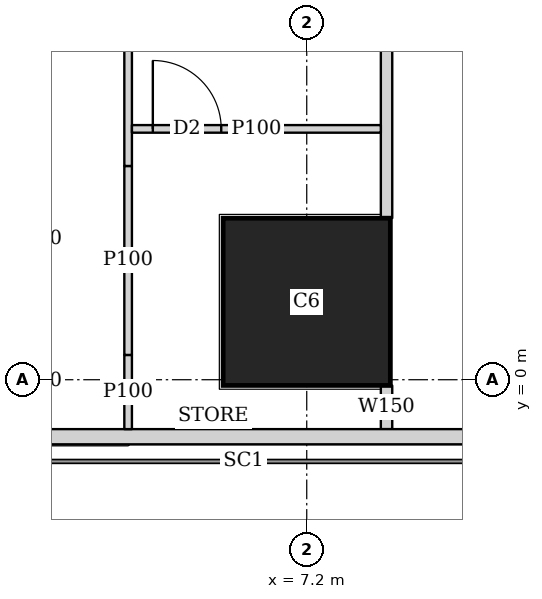
"""IFC4 building model, lengths in metres.
Left out: names, types, materials, properties, quantities, classifications, styles, units other than length and angle.
Written with IfcOpenShell. Run it as: python <this file> out.ifc"""

import sys

from ifc_helpers import new_model, si_unit, direction, frame, frame_2d, origin, origin_2d, place, context, subcontext, project, spatial, rectangle, extrude, element, fill, save


model = new_model("IFC4")
c1 = context("Model", 3, precision=1e-05, world=origin(), true_north=direction((0.0, 1.0)))
c2 = subcontext(c1, "Body", "Model", "MODEL_VIEW")
j1 = project(units=[si_unit("LENGTHUNIT", "METRE"), si_unit("PLANEANGLEUNIT", "RADIAN")], contexts=[c1])
p1 = place(None, origin())
s1 = spatial("IfcSite", under=j1, at=p1, CompositionType="ELEMENT")
p2 = place(p1, origin())
s2 = spatial("IfcBuilding", under=s1, at=p2, CompositionType="ELEMENT")
p3 = place(p2, frame((0.0, 0.0, 126.65)))
s3 = spatial("IfcBuildingStorey", under=s2, at=p3, CompositionType="ELEMENT", Elevation=126.65)
p4 = place(p3, frame((7.2, 1.025, 0.0), z_axis=(0.0, 0.0, 1.0), x_axis=(1.0, 0.0, 0.0)))
e1 = element("IfcColumn", 1, at=p4, inside=s3, PredefinedType="COLUMN", context=c2, shape_type="SweptSolid", body=[
    extrude(rectangle(XDim=2.2, YDim=2.2, at=origin_2d()), origin(), (0.0, 0.0, 1.0), 3.75),
])
p5 = place(p3, frame((2.163, -0.75, 0.0), z_axis=(0.0, 0.0, 1.0), x_axis=(1.0, 0.0, 0.0)))
e2 = element("IfcWall", 2, at=p5, inside=s3, PredefinedType="SOLIDWALL", context=c2, shape_type="SweptSolid", body=[
    extrude(rectangle(XDim=45.628, YDim=0.2, at=frame_2d((22.814, 0.0))), origin(), (0.0, 0.0, 1.0), 3.45),
])
p6 = place(p5, frame((9.537, 0.0, 0.9)))
e3 = element("IfcOpeningElement", 3, at=p6, cuts=e2, PredefinedType="OPENING", context=c2, shape_type="SweptSolid", body=[
    extrude(rectangle(XDim=1.8, YDim=1.5, at=frame_2d((0.9, 0.75))), frame((0.0, 0.11, 0.0), z_axis=(0.0, -1.0, 0.0), x_axis=(1.0, 0.0, 0.0)), (0.0, 0.0, 1.0), 0.22),
])
p7 = place(p5, frame((13.137, 0.0, 0.9)))
e4 = element("IfcOpeningElement", 4, at=p7, cuts=e2, PredefinedType="OPENING", context=c2, shape_type="SweptSolid", body=[
    extrude(rectangle(XDim=1.8, YDim=1.5, at=frame_2d((0.9, 0.75))), frame((0.0, 0.11, 0.0), z_axis=(0.0, -1.0, 0.0), x_axis=(1.0, 0.0, 0.0)), (0.0, 0.0, 1.0), 0.22),
])
p8 = place(p5, frame((16.737, 0.0, 0.9)))
e5 = element("IfcOpeningElement", 5, at=p8, cuts=e2, PredefinedType="OPENING", context=c2, shape_type="SweptSolid", body=[
    extrude(rectangle(XDim=1.8, YDim=1.5, at=frame_2d((0.9, 0.75))), frame((0.0, 0.11, 0.0), z_axis=(0.0, -1.0, 0.0), x_axis=(1.0, 0.0, 0.0)), (0.0, 0.0, 1.0), 0.22),
])
p9 = place(p5, frame((20.337, 0.0, 0.9)))
e6 = element("IfcOpeningElement", 6, at=p9, cuts=e2, PredefinedType="OPENING", context=c2, shape_type="SweptSolid", body=[
    extrude(rectangle(XDim=1.8, YDim=1.5, at=frame_2d((0.9, 0.75))), frame((0.0, 0.11, 0.0), z_axis=(0.0, -1.0, 0.0), x_axis=(1.0, 0.0, 0.0)), (0.0, 0.0, 1.0), 0.22),
])
p10 = place(p5, frame((23.937, 0.0, 0.9)))
e7 = element("IfcOpeningElement", 7, at=p10, cuts=e2, PredefinedType="OPENING", context=c2, shape_type="SweptSolid", body=[
    extrude(rectangle(XDim=1.8, YDim=1.5, at=frame_2d((0.9, 0.75))), frame((0.0, 0.11, 0.0), z_axis=(0.0, -1.0, 0.0), x_axis=(1.0, 0.0, 0.0)), (0.0, 0.0, 1.0), 0.22),
])
p11 = place(p5, frame((27.537, 0.0, 0.9)))
e8 = element("IfcOpeningElement", 8, at=p11, cuts=e2, PredefinedType="OPENING", context=c2, shape_type="SweptSolid", body=[
    extrude(rectangle(XDim=1.8, YDim=1.5, at=frame_2d((0.9, 0.75))), frame((0.0, 0.11, 0.0), z_axis=(0.0, -1.0, 0.0), x_axis=(1.0, 0.0, 0.0)), (0.0, 0.0, 1.0), 0.22),
])
p12 = place(p5, frame((31.137, 0.0, 0.9)))
e9 = element("IfcOpeningElement", 9, at=p12, cuts=e2, PredefinedType="OPENING", context=c2, shape_type="SweptSolid", body=[
    extrude(rectangle(XDim=1.8, YDim=1.5, at=frame_2d((0.9, 0.75))), frame((0.0, 0.11, 0.0), z_axis=(0.0, -1.0, 0.0), x_axis=(1.0, 0.0, 0.0)), (0.0, 0.0, 1.0), 0.22),
])
p13 = place(p5, frame((34.737, 0.0, 0.9)))
e10 = element("IfcOpeningElement", 10, at=p13, cuts=e2, PredefinedType="OPENING", context=c2, shape_type="SweptSolid", body=[
    extrude(rectangle(XDim=1.8, YDim=1.5, at=frame_2d((0.9, 0.75))), frame((0.0, 0.11, 0.0), z_axis=(0.0, -1.0, 0.0), x_axis=(1.0, 0.0, 0.0)), (0.0, 0.0, 1.0), 0.22),
])
p14 = place(p3, frame((8.25, -0.65, 0.0), z_axis=(0.0, 0.0, 1.0), x_axis=(0.0, 1.0, 0.0)))
e11 = element("IfcWall", 11, at=p14, inside=s3, PredefinedType="SOLIDWALL", context=c2, shape_type="SweptSolid", body=[
    extrude(rectangle(XDim=0.574, YDim=0.15, at=frame_2d((0.287, 0.0))), origin(), (0.0, 0.0, 1.0), 3.45),
])
p15 = place(p3, frame((8.25, 2.126, 0.0), z_axis=(0.0, 0.0, 1.0), x_axis=(0.0, 1.0, 0.0)))
e12 = element("IfcWall", 12, at=p15, inside=s3, PredefinedType="SOLIDWALL", context=c2, shape_type="SweptSolid", body=[
    extrude(rectangle(XDim=40.773, YDim=0.15, at=frame_2d((20.386, 0.0))), origin(), (0.0, 0.0, 1.0), 3.45),
])
p16 = place(p15, frame((10.286, 0.0, 0.0)))
e13 = element("IfcOpeningElement", 13, at=p16, cuts=e12, PredefinedType="OPENING", context=c2, shape_type="SweptSolid", body=[
    extrude(rectangle(XDim=1.0, YDim=2.1, at=frame_2d((0.5, 1.05))), frame((0.0, 0.085, 0.0), z_axis=(0.0, -1.0, 0.0), x_axis=(1.0, 0.0, 0.0)), (0.0, 0.0, 1.0), 0.17),
])
p17 = place(p15, frame((14.461, 0.0, 0.0)))
e14 = element("IfcOpeningElement", 14, at=p17, cuts=e12, PredefinedType="OPENING", context=c2, shape_type="SweptSolid", body=[
    extrude(rectangle(XDim=1.0, YDim=2.1, at=frame_2d((0.5, 1.05))), frame((0.0, 0.085, 0.0), z_axis=(0.0, -1.0, 0.0), x_axis=(1.0, 0.0, 0.0)), (0.0, 0.0, 1.0), 0.17),
])
p18 = place(p15, frame((21.962, 0.0, 0.0)))
e15 = element("IfcOpeningElement", 15, at=p18, cuts=e12, PredefinedType="OPENING", context=c2, shape_type="SweptSolid", body=[
    extrude(rectangle(XDim=1.0, YDim=2.1, at=frame_2d((0.5, 1.05))), frame((0.0, 0.085, 0.0), z_axis=(0.0, -1.0, 0.0), x_axis=(1.0, 0.0, 0.0)), (0.0, 0.0, 1.0), 0.17),
])
p19 = place(p15, frame((29.461, 0.0, 0.0)))
e16 = element("IfcOpeningElement", 16, at=p19, cuts=e12, PredefinedType="OPENING", context=c2, shape_type="SweptSolid", body=[
    extrude(rectangle(XDim=1.0, YDim=2.1, at=frame_2d((0.5, 1.05))), frame((0.0, 0.085, 0.0), z_axis=(0.0, -1.0, 0.0), x_axis=(1.0, 0.0, 0.0)), (0.0, 0.0, 1.0), 0.17),
])
p20 = place(p3, frame((4.85, -0.65, 0.0), z_axis=(0.0, 0.0, 1.0), x_axis=(0.0, 1.0, 0.0)))
e17 = element("IfcWall", 17, at=p20, inside=s3, PredefinedType="PARTITIONING", context=c2, shape_type="SweptSolid", body=[
    extrude(rectangle(XDim=0.976, YDim=0.1, at=frame_2d((0.488, 0.0))), origin(), (0.0, 0.0, 1.0), 3.45),
])
p21 = place(p3, frame((4.85, 0.326, 0.0), z_axis=(0.0, 0.0, 1.0), x_axis=(0.0, 1.0, 0.0)))
e18 = element("IfcWall", 18, at=p21, inside=s3, PredefinedType="PARTITIONING", context=c2, shape_type="SweptSolid", body=[
    extrude(rectangle(XDim=2.486, YDim=0.1, at=frame_2d((1.243, 0.0))), origin(), (0.0, 0.0, 1.0), 2.0),
])
p22 = place(p3, frame((4.85, 2.812, 0.0), z_axis=(0.0, 0.0, 1.0), x_axis=(0.0, 1.0, 0.0)))
e19 = element("IfcWall", 19, at=p22, inside=s3, PredefinedType="PARTITIONING", context=c2, shape_type="SweptSolid", body=[
    extrude(rectangle(XDim=8.438, YDim=0.1, at=frame_2d((4.219, 0.0))), origin(), (0.0, 0.0, 1.0), 3.45),
])
p23 = place(p22, frame((6.883, 0.0, 0.0)))
e20 = element("IfcOpeningElement", 20, at=p23, cuts=e19, PredefinedType="OPENING", context=c2, shape_type="SweptSolid", body=[
    extrude(rectangle(XDim=0.9, YDim=2.1, at=frame_2d((0.45, 1.05))), frame((0.0, 0.06, 0.0), z_axis=(0.0, -1.0, 0.0), x_axis=(1.0, 0.0, 0.0)), (0.0, 0.0, 1.0), 0.12),
])
p24 = place(p22, frame((3.438, 0.0, 0.0)))
e21 = element("IfcOpeningElement", 21, at=p24, cuts=e19, PredefinedType="OPENING", context=c2, shape_type="SweptSolid", body=[
    extrude(rectangle(XDim=0.9, YDim=2.1, at=frame_2d((0.45, 1.05))), frame((0.0, 0.06, 0.0), z_axis=(0.0, -1.0, 0.0), x_axis=(1.0, 0.0, 0.0)), (0.0, 0.0, 1.0), 0.12),
])
p25 = place(p22, frame((5.008, 0.0, 0.0)))
e22 = element("IfcOpeningElement", 22, at=p25, cuts=e19, PredefinedType="OPENING", context=c2, shape_type="SweptSolid", body=[
    extrude(rectangle(XDim=0.9, YDim=2.1, at=frame_2d((0.45, 1.05))), frame((0.0, 0.06, 0.0), z_axis=(0.0, -1.0, 0.0), x_axis=(1.0, 0.0, 0.0)), (0.0, 0.0, 1.0), 0.12),
])
p26 = place(p22, frame((1.563, 0.0, 0.0)))
e23 = element("IfcOpeningElement", 23, at=p26, cuts=e19, PredefinedType="OPENING", context=c2, shape_type="SweptSolid", body=[
    extrude(rectangle(XDim=0.9, YDim=2.1, at=frame_2d((0.45, 1.05))), frame((0.0, 0.06, 0.0), z_axis=(0.0, -1.0, 0.0), x_axis=(1.0, 0.0, 0.0)), (0.0, 0.0, 1.0), 0.12),
])
p27 = place(p3, frame((8.175, 3.3, 0.0), z_axis=(0.0, 0.0, 1.0), x_axis=(-1.0, 0.0, 0.0)))
e24 = element("IfcWall", 24, at=p27, inside=s3, PredefinedType="PARTITIONING", context=c2, shape_type="SweptSolid", body=[
    extrude(rectangle(XDim=3.275, YDim=0.1, at=frame_2d((1.638, 0.0))), origin(), (0.0, 0.0, 1.0), 3.45),
])
p28 = place(p27, frame((2.1, 0.0, 0.0)))
e25 = element("IfcOpeningElement", 25, at=p28, cuts=e24, PredefinedType="OPENING", context=c2, shape_type="SweptSolid", body=[
    extrude(rectangle(XDim=0.9, YDim=2.1, at=frame_2d((0.45, 1.05))), frame((0.0, 0.06, 0.0), z_axis=(0.0, -1.0, 0.0), x_axis=(1.0, 0.0, 0.0)), (0.0, 0.0, 1.0), 0.12),
])
p29 = place(p28, origin())
e26 = element("IfcDoor", 26, at=p29, inside=s3, OperationType="SINGLE_SWING_LEFT", PredefinedType="DOOR", context=c2, shape_type="SweptSolid", body=[
    extrude(rectangle(XDim=0.9, YDim=2.1, at=frame_2d((0.45, 1.05))), frame((0.0, 0.025, 0.0), z_axis=(0.0, -1.0, 0.0), x_axis=(1.0, 0.0, 0.0)), (0.0, 0.0, 1.0), 0.05),
])
fill(e25, e26)
save(model, sys.argv[1])
